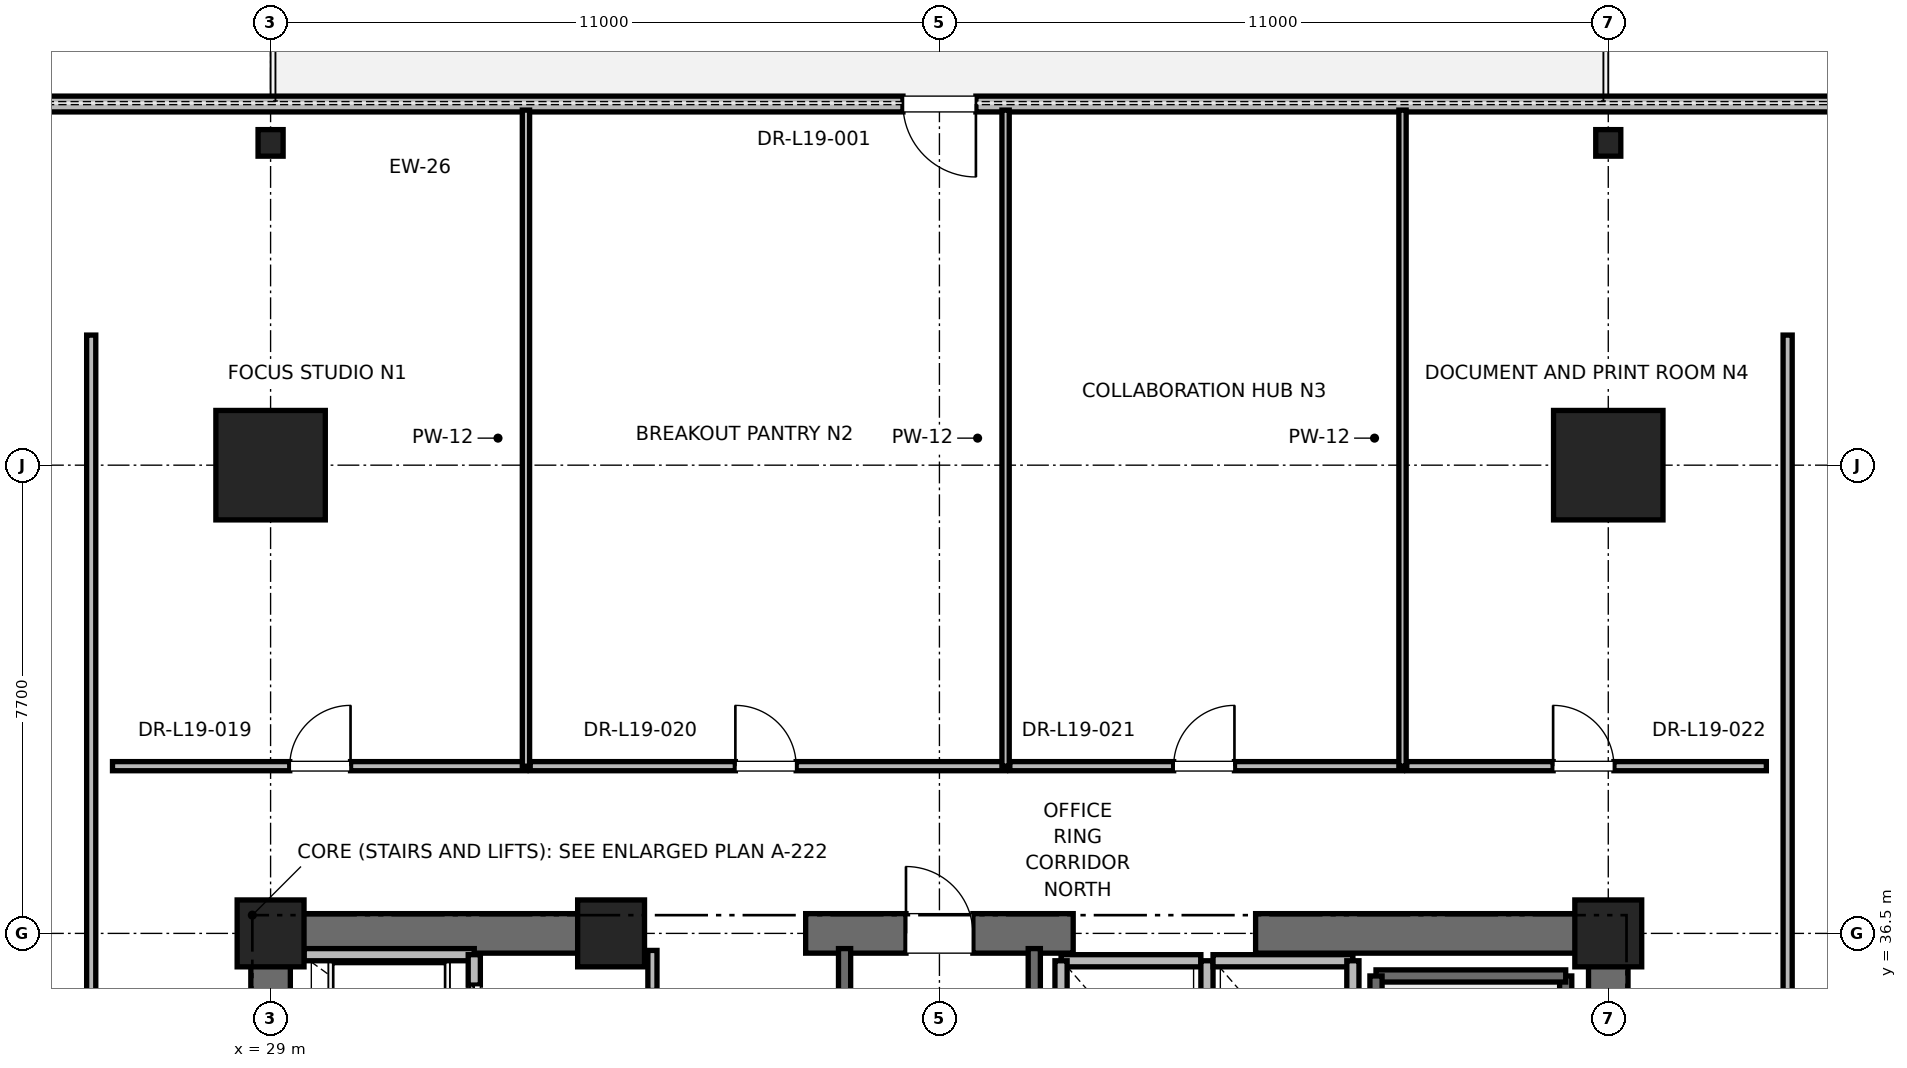
"""IFC4 building model, lengths in metres.
Left out: names, types, materials, properties, quantities, classifications, styles, units other than length and angle.
Written with IfcOpenShell. Run it as: python <this file> out.ifc"""

import sys

from ifc_helpers import new_model, si_unit, direction, frame, frame_2d, origin, origin_2d, place, context, subcontext, project, spatial, rectangle, i_section, extrude, element, fill, save


model = new_model("IFC4")
c1 = context("Model", 3, precision=1e-05, world=origin(), true_north=direction((0.0, 1.0)))
c2 = subcontext(c1, "Body", "Model", "MODEL_VIEW")
j1 = project(units=[si_unit("LENGTHUNIT", "METRE"), si_unit("PLANEANGLEUNIT", "RADIAN")], contexts=[c1])
p1 = place(None, origin())
s1 = spatial("IfcSite", under=j1, at=p1, CompositionType="ELEMENT")
p2 = place(p1, origin())
s2 = spatial("IfcBuilding", under=s1, at=p2, CompositionType="ELEMENT")
p3 = place(p2, frame((0.0, 0.0, 83.6)))
s3 = spatial("IfcBuildingStorey", under=s2, at=p3, CompositionType="ELEMENT", Elevation=83.6)
for number, where, z_axis, x_axis in (
    (1, (29.0, 44.2, 0.0), (0.0, 0.0, 1.0), (1.0, 0.0, 0.0)),
    (2, (51.0, 44.2, 0.0), (0.0, 0.0, 1.0), (1.0, 0.0, 0.0)),
):
    element("IfcColumn", number, at=place(p3, frame(where, z_axis=z_axis, x_axis=x_axis)), inside=s3, PredefinedType="COLUMN", context=c2, shape_type="SweptSolid", body=[
        extrude(rectangle(XDim=1.8, YDim=1.8, at=origin_2d()), origin(), (0.0, 0.0, 1.0), 4.0),
    ])
for number, where, z_axis, x_axis in (
    (3, (29.0, 49.5, 0.0), (0.0, 0.0, 1.0), (1.0, 0.0, 0.0)),
    (4, (51.0, 49.5, 0.0), (0.0, 0.0, 1.0), (1.0, 0.0, 0.0)),
):
    element("IfcColumn", number, at=place(p3, frame(where, z_axis=z_axis, x_axis=x_axis)), inside=s3, PredefinedType="COLUMN", context=c2, shape_type="SweptSolid", body=[
        extrude(i_section(OverallWidth=0.412, OverallDepth=0.437, WebThickness=0.036, FlangeThickness=0.058, FilletRadius=0.015, at=origin_2d()), origin(), (0.0, 0.0, 1.0), 4.0),
    ])
for number, where, z_axis, x_axis in (
    (5, (29.0, 36.5, 0.0), (0.0, 0.0, 1.0), (1.0, 0.0, 0.0)),
    (6, (51.0, 36.5, 0.0), (0.0, 0.0, 1.0), (1.0, 0.0, 0.0)),
    (7, (34.6, 36.5, 0.0), (0.0, 0.0, 1.0), (1.0, 0.0, 0.0)),
):
    element("IfcColumn", number, at=place(p3, frame(where, z_axis=z_axis, x_axis=x_axis)), inside=s3, PredefinedType="PILASTER", context=c2, shape_type="SweptSolid", body=[
        extrude(rectangle(XDim=1.1, YDim=1.1, at=origin_2d()), origin(), (0.0, 0.0, 1.0), 4.0),
    ])
p4 = place(p3, frame((29.0, 36.5, 0.0), z_axis=(0.0, 0.0, 1.0), x_axis=(1.0, 0.0, 0.0)))
e8 = element("IfcWall", 8, at=p4, inside=s3, PredefinedType="SHEAR", context=c2, shape_type="SweptSolid", body=[
    extrude(rectangle(XDim=5.8, YDim=0.65, at=frame_2d((2.9, 0.0))), origin(), (0.0, 0.0, 1.0), 3.76),
])
p5 = place(p3, frame((37.8, 36.5, 0.0), z_axis=(0.0, 0.0, 1.0), x_axis=(1.0, 0.0, 0.0)))
e9 = element("IfcWall", 9, at=p5, inside=s3, PredefinedType="SHEAR", context=c2, shape_type="SweptSolid", body=[
    extrude(rectangle(XDim=4.4, YDim=0.65, at=frame_2d((2.2, 0.0))), origin(), (0.0, 0.0, 1.0), 3.76),
])
p6 = place(p5, frame((1.65, 0.0, 0.0)))
e10 = element("IfcOpeningElement", 10, at=p6, cuts=e9, PredefinedType="OPENING", context=c2, shape_type="SweptSolid", body=[
    extrude(rectangle(XDim=1.1, YDim=2.15, at=frame_2d((0.55, 1.075))), frame((0.0, 0.325, 0.0), z_axis=(0.0, -1.0, 0.0), x_axis=(1.0, 0.0, 0.0)), (0.0, 0.0, 1.0), 0.65),
])
for number, where, z_axis, x_axis in (
    (11, (45.2, 36.5, 0.0), (0.0, 0.0, 1.0), (1.0, 0.0, 0.0)),
    (12, (29.0, 30.7, 0.0), (0.0, 0.0, 1.0), (0.0, 1.0, 0.0)),
):
    element("IfcWall", number, at=place(p3, frame(where, z_axis=z_axis, x_axis=x_axis)), inside=s3, PredefinedType="SHEAR", context=c2, shape_type="SweptSolid", body=[
        extrude(rectangle(XDim=5.8, YDim=0.65, at=frame_2d((2.9, 0.0))), origin(), (0.0, 0.0, 1.0), 3.76),
    ])
p7 = place(p3, frame((51.0, 27.7, 0.0), z_axis=(0.0, 0.0, 1.0), x_axis=(0.0, 1.0, 0.0)))
e13 = element("IfcWall", 13, at=p7, inside=s3, PredefinedType="SHEAR", context=c2, shape_type="SweptSolid", body=[
    extrude(rectangle(XDim=8.8, YDim=0.65, at=frame_2d((4.4, 0.0))), origin(), (0.0, 0.0, 1.0), 3.76),
])
p8 = place(p3, frame((62.485, 50.139, 0.0), z_axis=(0.0, 0.0, 1.0), x_axis=(-1.0, 0.0, 0.0)))
e14 = element("IfcWall", 14, at=p8, inside=s3, PredefinedType="PARAPET", context=c2, shape_type="SweptSolid", body=[
    extrude(rectangle(XDim=44.969, YDim=0.26, at=frame_2d((22.485, 0.0))), origin(), (0.0, 0.0, 1.0), 3.76),
])
p9 = place(p8, frame((4.2, 0.0, 0.85)))
e15 = element("IfcOpeningElement", 15, at=p9, cuts=e14, PredefinedType="OPENING", context=c2, shape_type="SweptSolid", body=[
    extrude(rectangle(XDim=1.8, YDim=2.2, at=frame_2d((0.9, 1.1))), frame((0.0, 0.13, 0.0), z_axis=(0.0, -1.0, 0.0), x_axis=(1.0, 0.0, 0.0)), (0.0, 0.0, 1.0), 0.26),
])
p10 = place(p8, frame((21.885, 0.0, 0.0)))
e16 = element("IfcOpeningElement", 16, at=p10, cuts=e14, PredefinedType="OPENING", context=c2, shape_type="SweptSolid", body=[
    extrude(rectangle(XDim=1.2, YDim=2.2, at=frame_2d((0.6, 1.1))), frame((0.0, 0.13, 0.0), z_axis=(0.0, -1.0, 0.0), x_axis=(1.0, 0.0, 0.0)), (0.0, 0.0, 1.0), 0.26),
])
p11 = place(p8, frame((38.969, 0.0, 0.85)))
e17 = element("IfcOpeningElement", 17, at=p11, cuts=e14, PredefinedType="OPENING", context=c2, shape_type="SweptSolid", body=[
    extrude(rectangle(XDim=1.8, YDim=2.2, at=frame_2d((0.9, 1.1))), frame((0.0, 0.13, 0.0), z_axis=(0.0, -1.0, 0.0), x_axis=(1.0, 0.0, 0.0)), (0.0, 0.0, 1.0), 0.26),
])
p12 = place(p3, frame((50.3, 27.65, 0.0), z_axis=(0.0, 0.0, 1.0), x_axis=(0.0, 1.0, 0.0)))
e18 = element("IfcWall", 18, at=p12, inside=s3, PredefinedType="SOLIDWALL", context=c2, shape_type="SweptSolid", body=[
    extrude(rectangle(XDim=8.15, YDim=0.2, at=frame_2d((4.075, 0.0))), origin(), (0.0, 0.0, 1.0), 3.76),
])
p13 = place(p3, frame((47.18, 35.8, 0.0), z_axis=(0.0, 0.0, 1.0), x_axis=(1.0, 0.0, 0.0)))
e19 = element("IfcWall", 19, at=p13, inside=s3, PredefinedType="SOLIDWALL", context=c2, shape_type="SweptSolid", body=[
    extrude(rectangle(XDim=3.12, YDim=0.2, at=frame_2d((1.56, 0.0))), origin(), (0.0, 0.0, 1.0), 3.76),
])
p14 = place(p3, frame((47.18, 27.62, 0.0), z_axis=(0.0, 0.0, 1.0), x_axis=(0.0, 1.0, 0.0)))
e20 = element("IfcWall", 20, at=p14, inside=s3, PredefinedType="SOLIDWALL", context=c2, shape_type="SweptSolid", body=[
    extrude(rectangle(XDim=8.18, YDim=0.2, at=frame_2d((4.09, 0.0))), origin(), (0.0, 0.0, 1.0), 3.76),
])
p15 = place(p3, frame((38.44, 27.38, 0.0), z_axis=(0.0, 0.0, 1.0), x_axis=(0.0, 1.0, 0.0)))
e21 = element("IfcWall", 21, at=p15, inside=s3, PredefinedType="SOLIDWALL", context=c2, shape_type="SweptSolid", body=[
    extrude(rectangle(XDim=8.87, YDim=0.2, at=frame_2d((4.435, 0.0))), origin(), (0.0, 0.0, 1.0), 3.76),
])
p16 = place(p3, frame((41.56, 27.68, 0.0), z_axis=(0.0, 0.0, 1.0), x_axis=(0.0, 1.0, 0.0)))
e22 = element("IfcWall", 22, at=p16, inside=s3, PredefinedType="SOLIDWALL", context=c2, shape_type="SweptSolid", body=[
    extrude(rectangle(XDim=8.57, YDim=0.2, at=frame_2d((4.285, 0.0))), origin(), (0.0, 0.0, 1.0), 3.76),
])
p17 = place(p3, frame((32.35, 36.15, 0.0), z_axis=(0.0, 0.0, 1.0), x_axis=(-1.0, 0.0, 0.0)))
e23 = element("IfcWall", 23, at=p17, inside=s3, PredefinedType="SOLIDWALL", context=c2, shape_type="SweptSolid", body=[
    extrude(rectangle(XDim=2.8, YDim=0.2, at=frame_2d((1.4, 0.0))), origin(), (0.0, 0.0, 1.0), 2.889),
])
p18 = place(p3, frame((32.35, 34.05, 0.0), z_axis=(0.0, 0.0, 1.0), x_axis=(0.0, 1.0, 0.0)))
e24 = element("IfcWall", 24, at=p18, inside=s3, PredefinedType="SOLIDWALL", context=c2, shape_type="SweptSolid", body=[
    extrude(rectangle(XDim=2.1, YDim=0.2, at=frame_2d((1.05, 0.0))), origin(), (0.0, 0.0, 1.0), 3.76),
])
p19 = place(p18, frame((0.5, 0.0, 0.0)))
e25 = element("IfcOpeningElement", 25, at=p19, cuts=e24, PredefinedType="OPENING", context=c2, shape_type="SweptSolid", body=[
    extrude(rectangle(XDim=1.1, YDim=2.2, at=frame_2d((0.55, 1.1))), frame((0.0, 0.1, 0.0), z_axis=(0.0, -1.0, 0.0), x_axis=(1.0, 0.0, 0.0)), (0.0, 0.0, 1.0), 0.2),
])
p20 = place(p3, frame((44.3, 36.05, 0.0), z_axis=(0.0, 0.0, 1.0), x_axis=(-1.0, 0.0, 0.0)))
e26 = element("IfcWall", 26, at=p20, inside=s3, PredefinedType="SOLIDWALL", context=c2, shape_type="SweptSolid", body=[
    extrude(rectangle(XDim=2.3, YDim=0.2, at=frame_2d((1.15, 0.0))), origin(), (0.0, 0.0, 1.0), 2.54),
])
for number, where, z_axis, x_axis in (
    (27, (42.0, 36.05, 0.0), (0.0, 0.0, 1.0), (0.0, -1.0, 0.0)),
    (28, (44.4, 33.45, 0.0), (0.0, 0.0, 1.0), (0.0, 1.0, 0.0)),
):
    element("IfcWall", number, at=place(p3, frame(where, z_axis=z_axis, x_axis=x_axis)), inside=s3, PredefinedType="SOLIDWALL", context=c2, shape_type="SweptSolid", body=[
        extrude(rectangle(XDim=2.6, YDim=0.2, at=frame_2d((1.3, 0.0))), origin(), (0.0, 0.0, 1.0), 2.54),
    ])
p21 = place(p3, frame((46.8, 36.05, 0.0), z_axis=(0.0, 0.0, 1.0), x_axis=(-1.0, 0.0, 0.0)))
e29 = element("IfcWall", 29, at=p21, inside=s3, PredefinedType="SOLIDWALL", context=c2, shape_type="SweptSolid", body=[
    extrude(rectangle(XDim=2.3, YDim=0.2, at=frame_2d((1.15, 0.0))), origin(), (0.0, 0.0, 1.0), 2.54),
])
p22 = place(p3, frame((46.8, 33.45, 0.0), z_axis=(0.0, 0.0, 1.0), x_axis=(0.0, 1.0, 0.0)))
e30 = element("IfcWall", 30, at=p22, inside=s3, PredefinedType="SOLIDWALL", context=c2, shape_type="SweptSolid", body=[
    extrude(rectangle(XDim=2.6, YDim=0.2, at=frame_2d((1.3, 0.0))), origin(), (0.0, 0.0, 1.0), 3.76),
])
p23 = place(p3, frame((35.28, 33.95, 0.0), z_axis=(0.0, 0.0, 1.0), x_axis=(0.0, 1.0, 0.0)))
e31 = element("IfcWall", 31, at=p23, inside=s3, PredefinedType="PARTITIONING", context=c2, shape_type="SweptSolid", body=[
    extrude(rectangle(XDim=2.27, YDim=0.15, at=frame_2d((1.135, 0.0))), origin(), (0.0, 0.0, 1.0), 2.54),
])
p24 = place(p23, frame((0.66, 0.0, 0.0)))
e32 = element("IfcOpeningElement", 32, at=p24, cuts=e31, PredefinedType="OPENING", context=c2, shape_type="SweptSolid", body=[
    extrude(rectangle(XDim=0.95, YDim=2.15, at=frame_2d((0.475, 1.075))), frame((0.0, 0.075, 0.0), z_axis=(0.0, -1.0, 0.0), x_axis=(1.0, 0.0, 0.0)), (0.0, 0.0, 1.0), 0.15),
])
p25 = place(p3, frame((26.4, 39.25, 0.0), z_axis=(0.0, 0.0, 1.0), x_axis=(1.0, 0.0, 0.0)))
e33 = element("IfcWall", 33, at=p25, inside=s3, PredefinedType="PARTITIONING", context=c2, shape_type="SweptSolid", body=[
    extrude(rectangle(XDim=6.8, YDim=0.15, at=frame_2d((3.4, 0.0))), origin(), (0.0, 0.0, 1.0), 2.85),
])
p26 = place(p25, frame((2.915, 0.0, 0.0)))
e34 = element("IfcOpeningElement", 34, at=p26, cuts=e33, PredefinedType="OPENING", context=c2, shape_type="SweptSolid", body=[
    extrude(rectangle(XDim=1.0, YDim=2.15, at=frame_2d((0.5, 1.075))), frame((0.0, 0.075, 0.0), z_axis=(0.0, -1.0, 0.0), x_axis=(1.0, 0.0, 0.0)), (0.0, 0.0, 1.0), 0.15),
])
p27 = place(p3, frame((33.2, 39.25, 0.0), z_axis=(0.0, 0.0, 1.0), x_axis=(0.0, 1.0, 0.0)))
e35 = element("IfcWall", 35, at=p27, inside=s3, PredefinedType="PARTITIONING", context=c2, shape_type="SweptSolid", body=[
    extrude(rectangle(XDim=10.789, YDim=0.12, at=frame_2d((5.395, 0.0))), origin(), (0.0, 0.0, 1.0), 2.39),
])
p28 = place(p3, frame((33.27, 39.25, 0.0), z_axis=(0.0, 0.0, 1.0), x_axis=(1.0, 0.0, 0.0)))
e36 = element("IfcWall", 36, at=p28, inside=s3, PredefinedType="PARTITIONING", context=c2, shape_type="SweptSolid", body=[
    extrude(rectangle(XDim=7.818, YDim=0.15, at=frame_2d((3.909, 0.0))), origin(), (0.0, 0.0, 1.0), 2.85),
])
p29 = place(p28, frame((3.374, 0.0, 0.0)))
e37 = element("IfcOpeningElement", 37, at=p29, cuts=e36, PredefinedType="OPENING", context=c2, shape_type="SweptSolid", body=[
    extrude(rectangle(XDim=1.0, YDim=2.15, at=frame_2d((0.5, 1.075))), frame((0.0, 0.075, 0.0), z_axis=(0.0, -1.0, 0.0), x_axis=(1.0, 0.0, 0.0)), (0.0, 0.0, 1.0), 0.15),
])
p30 = place(p3, frame((41.088, 39.25, 0.0), z_axis=(0.0, 0.0, 1.0), x_axis=(0.0, 1.0, 0.0)))
e38 = element("IfcWall", 38, at=p30, inside=s3, PredefinedType="PARTITIONING", context=c2, shape_type="SweptSolid", body=[
    extrude(rectangle(XDim=10.789, YDim=0.12, at=frame_2d((5.395, 0.0))), origin(), (0.0, 0.0, 1.0), 2.39),
])
p31 = place(p3, frame((41.158, 39.25, 0.0), z_axis=(0.0, 0.0, 1.0), x_axis=(1.0, 0.0, 0.0)))
e39 = element("IfcWall", 39, at=p31, inside=s3, PredefinedType="PARTITIONING", context=c2, shape_type="SweptSolid", body=[
    extrude(rectangle(XDim=6.458, YDim=0.15, at=frame_2d((3.229, 0.0))), origin(), (0.0, 0.0, 1.0), 2.85),
])
p32 = place(p31, frame((2.694, 0.0, 0.0)))
e40 = element("IfcOpeningElement", 40, at=p32, cuts=e39, PredefinedType="OPENING", context=c2, shape_type="SweptSolid", body=[
    extrude(rectangle(XDim=1.0, YDim=2.15, at=frame_2d((0.5, 1.075))), frame((0.0, 0.075, 0.0), z_axis=(0.0, -1.0, 0.0), x_axis=(1.0, 0.0, 0.0)), (0.0, 0.0, 1.0), 0.15),
])
p33 = place(p3, frame((47.616, 39.25, 0.0), z_axis=(0.0, 0.0, 1.0), x_axis=(0.0, 1.0, 0.0)))
e41 = element("IfcWall", 41, at=p33, inside=s3, PredefinedType="PARTITIONING", context=c2, shape_type="SweptSolid", body=[
    extrude(rectangle(XDim=10.789, YDim=0.12, at=frame_2d((5.395, 0.0))), origin(), (0.0, 0.0, 1.0), 2.39),
])
p34 = place(p3, frame((47.686, 39.25, 0.0), z_axis=(0.0, 0.0, 1.0), x_axis=(1.0, 0.0, 0.0)))
e42 = element("IfcWall", 42, at=p34, inside=s3, PredefinedType="PARTITIONING", context=c2, shape_type="SweptSolid", body=[
    extrude(rectangle(XDim=5.914, YDim=0.15, at=frame_2d((2.957, 0.0))), origin(), (0.0, 0.0, 1.0), 2.85),
])
p35 = place(p34, frame((2.407, 0.0, 0.0)))
e43 = element("IfcOpeningElement", 43, at=p35, cuts=e42, PredefinedType="OPENING", context=c2, shape_type="SweptSolid", body=[
    extrude(rectangle(XDim=1.0, YDim=2.15, at=frame_2d((0.5, 1.075))), frame((0.0, 0.075, 0.0), z_axis=(0.0, -1.0, 0.0), x_axis=(1.0, 0.0, 0.0)), (0.0, 0.0, 1.0), 0.15),
])
p36 = place(p3, frame((26.05, 8.661, 0.0), z_axis=(0.0, 0.0, 1.0), x_axis=(0.0, 1.0, 0.0)))
e44 = element("IfcWall", 44, at=p36, inside=s3, PredefinedType="PARTITIONING", context=c2, shape_type="SweptSolid", body=[
    extrude(rectangle(XDim=37.678, YDim=0.15, at=frame_2d((18.839, 0.0))), origin(), (0.0, 0.0, 1.0), 2.85),
])
p37 = place(p36, frame((18.339, 0.0, 0.0)))
e45 = element("IfcOpeningElement", 45, at=p37, cuts=e44, PredefinedType="OPENING", context=c2, shape_type="SweptSolid", body=[
    extrude(rectangle(XDim=1.0, YDim=2.15, at=frame_2d((0.5, 1.075))), frame((0.0, 0.075, 0.0), z_axis=(0.0, -1.0, 0.0), x_axis=(1.0, 0.0, 0.0)), (0.0, 0.0, 1.0), 0.15),
])
p38 = place(p3, frame((53.95, 29.831, 0.0), z_axis=(0.0, 0.0, 1.0), x_axis=(0.0, 1.0, 0.0)))
e46 = element("IfcWall", 46, at=p38, inside=s3, PredefinedType="PARTITIONING", context=c2, shape_type="SweptSolid", body=[
    extrude(rectangle(XDim=16.508, YDim=0.15, at=frame_2d((8.254, 0.0))), origin(), (0.0, 0.0, 1.0), 2.85),
])
p39 = place(p38, frame((2.785, 0.0, 0.0)))
e47 = element("IfcOpeningElement", 47, at=p39, cuts=e46, PredefinedType="OPENING", context=c2, shape_type="SweptSolid", body=[
    extrude(rectangle(XDim=1.0, YDim=2.15, at=frame_2d((0.5, 1.075))), frame((0.0, 0.075, 0.0), z_axis=(0.0, -1.0, 0.0), x_axis=(1.0, 0.0, 0.0)), (0.0, 0.0, 1.0), 0.15),
])
p40 = place(p10, origin())
e48 = element("IfcDoor", 48, at=p40, inside=s3, OperationType="SINGLE_SWING_LEFT", PredefinedType="DOOR", context=c2, shape_type="SweptSolid", body=[
    extrude(rectangle(XDim=1.2, YDim=2.2, at=frame_2d((0.6, 1.1))), frame((0.0, 0.025, 0.0), z_axis=(0.0, -1.0, 0.0), x_axis=(1.0, 0.0, 0.0)), (0.0, 0.0, 1.0), 0.05),
])
fill(e16, e48)
p41 = place(p6, origin())
e49 = element("IfcDoor", 49, at=p41, inside=s3, OperationType="SINGLE_SWING_LEFT", PredefinedType="DOOR", context=c2, shape_type="SweptSolid", body=[
    extrude(rectangle(XDim=1.1, YDim=2.15, at=frame_2d((0.55, 1.075))), frame((0.0, 0.025, 0.0), z_axis=(0.0, -1.0, 0.0), x_axis=(1.0, 0.0, 0.0)), (0.0, 0.0, 1.0), 0.05),
])
fill(e10, e49)
p42 = place(p19, origin())
e50 = element("IfcDoor", 50, at=p42, inside=s3, OperationType="SLIDING_TO_RIGHT", PredefinedType="DOOR", context=c2, shape_type="SweptSolid", body=[
    extrude(rectangle(XDim=1.1, YDim=2.2, at=frame_2d((0.55, 1.1))), frame((0.0, 0.025, 0.0), z_axis=(0.0, -1.0, 0.0), x_axis=(1.0, 0.0, 0.0)), (0.0, 0.0, 1.0), 0.05),
])
fill(e25, e50)
p43 = place(p26, origin())
e51 = element("IfcDoor", 51, at=p43, inside=s3, OperationType="SINGLE_SWING_RIGHT", PredefinedType="DOOR", context=c2, shape_type="SweptSolid", body=[
    extrude(rectangle(XDim=1.0, YDim=2.15, at=frame_2d((0.5, 1.075))), frame((0.0, 0.025, 0.0), z_axis=(0.0, -1.0, 0.0), x_axis=(1.0, 0.0, 0.0)), (0.0, 0.0, 1.0), 0.05),
])
fill(e34, e51)
p44 = place(p29, origin())
e52 = element("IfcDoor", 52, at=p44, inside=s3, OperationType="SINGLE_SWING_LEFT", PredefinedType="DOOR", context=c2, shape_type="SweptSolid", body=[
    extrude(rectangle(XDim=1.0, YDim=2.15, at=frame_2d((0.5, 1.075))), frame((0.0, 0.025, 0.0), z_axis=(0.0, -1.0, 0.0), x_axis=(1.0, 0.0, 0.0)), (0.0, 0.0, 1.0), 0.05),
])
fill(e37, e52)
p45 = place(p32, origin())
e53 = element("IfcDoor", 53, at=p45, inside=s3, OperationType="SINGLE_SWING_RIGHT", PredefinedType="DOOR", context=c2, shape_type="SweptSolid", body=[
    extrude(rectangle(XDim=1.0, YDim=2.15, at=frame_2d((0.5, 1.075))), frame((0.0, 0.025, 0.0), z_axis=(0.0, -1.0, 0.0), x_axis=(1.0, 0.0, 0.0)), (0.0, 0.0, 1.0), 0.05),
])
fill(e40, e53)
p46 = place(p35, origin())
e54 = element("IfcDoor", 54, at=p46, inside=s3, OperationType="SINGLE_SWING_LEFT", PredefinedType="DOOR", context=c2, shape_type="SweptSolid", body=[
    extrude(rectangle(XDim=1.0, YDim=2.15, at=frame_2d((0.5, 1.075))), frame((0.0, 0.025, 0.0), z_axis=(0.0, -1.0, 0.0), x_axis=(1.0, 0.0, 0.0)), (0.0, 0.0, 1.0), 0.05),
])
fill(e43, e54)
save(model, sys.argv[1])
